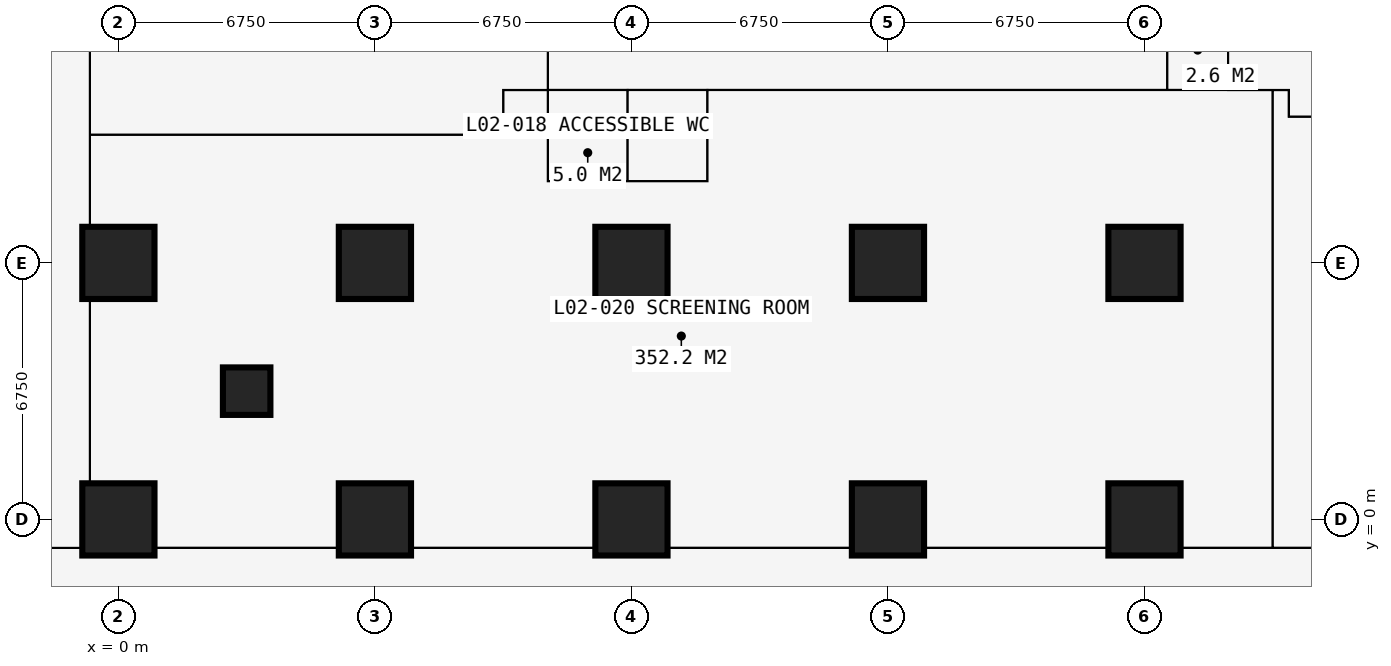
"""IFC4 building model, lengths in metres.
Left out: names, types, materials, properties, quantities, classifications, styles, units other than length and angle.
Written with IfcOpenShell. Run it as: python <this file> out.ifc"""

import sys

from ifc_helpers import new_model, si_unit, direction, frame, frame_2d, origin, origin_2d, place, context, subcontext, project, spatial, rectangle, extrude, element, fill, save


model = new_model("IFC4")
c1 = context("Model", 3, precision=1e-05, world=origin(), true_north=direction((0.0, 1.0)))
c2 = subcontext(c1, "Body", "Model", "MODEL_VIEW")
j1 = project(units=[si_unit("LENGTHUNIT", "METRE"), si_unit("PLANEANGLEUNIT", "RADIAN")], contexts=[c1])
p1 = place(None, origin())
s1 = spatial("IfcSite", under=j1, at=p1, CompositionType="ELEMENT")
p2 = place(p1, origin())
s2 = spatial("IfcBuilding", under=s1, at=p2, CompositionType="ELEMENT")
p3 = place(p2, frame((0.0, 0.0, 9.0)))
s3 = spatial("IfcBuildingStorey", under=s2, at=p3, CompositionType="ELEMENT", Elevation=9.0)
for number, where, z_axis, x_axis in (
    (1, (0.0, 0.0, 0.0), (0.0, 0.0, 1.0), (1.0, 0.0, 0.0)),
    (2, (0.0, 6.75, 0.0), (0.0, 0.0, 1.0), (1.0, 0.0, 0.0)),
):
    element("IfcColumn", number, at=place(p3, frame(where, z_axis=z_axis, x_axis=x_axis)), inside=s3, PredefinedType="COLUMN", context=c2, shape_type="SweptSolid", body=[
        extrude(rectangle(XDim=1.9, YDim=1.9, at=origin_2d()), origin(), (0.0, 0.0, 1.0), 4.5),
    ])
p4 = place(p3, frame((3.375, 3.375, 0.0), z_axis=(0.0, 0.0, 1.0), x_axis=(1.0, 0.0, 0.0)))
e3 = element("IfcColumn", 3, at=p4, inside=s3, PredefinedType="COLUMN", context=c2, shape_type="SweptSolid", body=[
    extrude(rectangle(XDim=1.25, YDim=1.25, at=origin_2d()), origin(), (0.0, 0.0, 1.0), 4.5),
])
for number, where, z_axis, x_axis in (
    (4, (6.75, 0.0, 0.0), (0.0, 0.0, 1.0), (1.0, 0.0, 0.0)),
    (5, (6.75, 6.75, 0.0), (0.0, 0.0, 1.0), (1.0, 0.0, 0.0)),
    (6, (13.5, 0.0, 0.0), (0.0, 0.0, 1.0), (1.0, 0.0, 0.0)),
    (7, (13.5, 6.75, 0.0), (0.0, 0.0, 1.0), (1.0, 0.0, 0.0)),
    (8, (20.25, 0.0, 0.0), (0.0, 0.0, 1.0), (1.0, 0.0, 0.0)),
    (9, (20.25, 6.75, 0.0), (0.0, 0.0, 1.0), (1.0, 0.0, 0.0)),
    (10, (27.0, 0.0, 0.0), (0.0, 0.0, 1.0), (1.0, 0.0, 0.0)),
    (11, (27.0, 6.75, 0.0), (0.0, 0.0, 1.0), (1.0, 0.0, 0.0)),
):
    element("IfcColumn", number, at=place(p3, frame(where, z_axis=z_axis, x_axis=x_axis)), inside=s3, PredefinedType="COLUMN", context=c2, shape_type="SweptSolid", body=[
        extrude(rectangle(XDim=1.9, YDim=1.9, at=origin_2d()), origin(), (0.0, 0.0, 1.0), 4.5),
    ])
p5 = place(p3, frame((-7.484, -0.75, 0.0), z_axis=(0.0, 0.0, 1.0), x_axis=(1.0, 0.0, 0.0)))
e12 = element("IfcWall", 12, at=p5, inside=s3, PredefinedType="PARTITIONING", context=c2, shape_type="SweptSolid", body=[
    extrude(rectangle(XDim=50.334, YDim=0.15, at=frame_2d((25.167, 0.0))), origin(), (0.0, 0.0, 1.0), 4.25),
])
p6 = place(p5, frame((21.934, 0.0, 0.0)))
e13 = element("IfcOpeningElement", 13, at=p6, cuts=e12, PredefinedType="OPENING", context=c2, shape_type="SweptSolid", body=[
    extrude(rectangle(XDim=1.6, YDim=2.4, at=frame_2d((0.8, 1.2))), frame((0.0, 0.085, 0.0), z_axis=(0.0, -1.0, 0.0), x_axis=(1.0, 0.0, 0.0)), (0.0, 0.0, 1.0), 0.17),
])
p7 = place(p3, frame((-0.75, -0.75, 0.0), z_axis=(0.0, 0.0, 1.0), x_axis=(0.0, 1.0, 0.0)))
e14 = element("IfcWall", 14, at=p7, inside=s3, PredefinedType="PARTITIONING", context=c2, shape_type="SweptSolid", body=[
    extrude(rectangle(XDim=41.984, YDim=0.15, at=frame_2d((20.992, 0.0))), origin(), (0.0, 0.0, 1.0), 4.25),
])
p8 = place(p7, frame((4.65, 0.0, 0.0)))
e15 = element("IfcOpeningElement", 15, at=p8, cuts=e14, PredefinedType="OPENING", context=c2, shape_type="SweptSolid", body=[
    extrude(rectangle(XDim=1.6, YDim=2.4, at=frame_2d((0.8, 1.2))), frame((0.0, 0.085, 0.0), z_axis=(0.0, -1.0, 0.0), x_axis=(1.0, 0.0, 0.0)), (0.0, 0.0, 1.0), 0.17),
])
p9 = place(p3, frame((-0.75, 10.125, 0.0), z_axis=(0.0, 0.0, 1.0), x_axis=(1.0, 0.0, 0.0)))
e16 = element("IfcWall", 16, at=p9, inside=s3, PredefinedType="PARTITIONING", context=c2, shape_type="SweptSolid", body=[
    extrude(rectangle(XDim=10.875, YDim=0.15, at=frame_2d((5.438, 0.0))), origin(), (0.0, 0.0, 1.0), 4.25),
])
p10 = place(p3, frame((10.125, 10.125, 0.0), z_axis=(0.0, 0.0, 1.0), x_axis=(0.0, 1.0, 0.0)))
e17 = element("IfcWall", 17, at=p10, inside=s3, PredefinedType="PARTITIONING", context=c2, shape_type="SweptSolid", body=[
    extrude(rectangle(XDim=1.175, YDim=0.15, at=frame_2d((0.587, 0.0))), origin(), (0.0, 0.0, 1.0), 4.25),
])
p11 = place(p3, frame((10.125, 11.3, 0.0), z_axis=(0.0, 0.0, 1.0), x_axis=(1.0, 0.0, 0.0)))
e18 = element("IfcWall", 18, at=p11, inside=s3, PredefinedType="PARTITIONING", context=c2, shape_type="SweptSolid", body=[
    extrude(rectangle(XDim=20.675, YDim=0.15, at=frame_2d((10.337, 0.0))), origin(), (0.0, 0.0, 1.0), 4.25),
])
p12 = place(p11, frame((1.725, 0.0, 0.0)))
e19 = element("IfcOpeningElement", 19, at=p12, cuts=e18, PredefinedType="OPENING", context=c2, shape_type="SweptSolid", body=[
    extrude(rectangle(XDim=1.0, YDim=2.2, at=frame_2d((0.5, 1.1))), frame((0.0, 0.085, 0.0), z_axis=(0.0, -1.0, 0.0), x_axis=(1.0, 0.0, 0.0)), (0.0, 0.0, 1.0), 0.17),
])
p13 = place(p11, frame((3.825, 0.0, 0.0)))
e20 = element("IfcOpeningElement", 20, at=p13, cuts=e18, PredefinedType="OPENING", context=c2, shape_type="SweptSolid", body=[
    extrude(rectangle(XDim=1.0, YDim=2.2, at=frame_2d((0.5, 1.1))), frame((0.0, 0.085, 0.0), z_axis=(0.0, -1.0, 0.0), x_axis=(1.0, 0.0, 0.0)), (0.0, 0.0, 1.0), 0.17),
])
p14 = place(p11, frame((10.675, 0.0, 0.0)))
e21 = element("IfcOpeningElement", 21, at=p14, cuts=e18, PredefinedType="OPENING", context=c2, shape_type="SweptSolid", body=[
    extrude(rectangle(XDim=1.5, YDim=2.2, at=frame_2d((0.75, 1.1))), frame((0.0, 0.085, 0.0), z_axis=(0.0, -1.0, 0.0), x_axis=(1.0, 0.0, 0.0)), (0.0, 0.0, 1.0), 0.17),
])
p15 = place(p3, frame((11.3, 8.9, 0.0), z_axis=(0.0, 0.0, 1.0), x_axis=(0.0, 1.0, 0.0)))
e22 = element("IfcWall", 22, at=p15, inside=s3, PredefinedType="PARTITIONING", context=c2, shape_type="SweptSolid", body=[
    extrude(rectangle(XDim=21.475, YDim=0.15, at=frame_2d((10.738, 0.0))), origin(), (0.0, 0.0, 1.0), 4.25),
])
p16 = place(p15, frame((16.65, 0.0, 0.0)))
e23 = element("IfcOpeningElement", 23, at=p16, cuts=e22, PredefinedType="OPENING", context=c2, shape_type="SweptSolid", body=[
    extrude(rectangle(XDim=1.0, YDim=2.2, at=frame_2d((0.5, 1.1))), frame((0.0, 0.085, 0.0), z_axis=(0.0, -1.0, 0.0), x_axis=(1.0, 0.0, 0.0)), (0.0, 0.0, 1.0), 0.17),
])
p17 = place(p15, frame((18.75, 0.0, 0.0)))
e24 = element("IfcOpeningElement", 24, at=p17, cuts=e22, PredefinedType="OPENING", context=c2, shape_type="SweptSolid", body=[
    extrude(rectangle(XDim=1.0, YDim=2.2, at=frame_2d((0.5, 1.1))), frame((0.0, 0.085, 0.0), z_axis=(0.0, -1.0, 0.0), x_axis=(1.0, 0.0, 0.0)), (0.0, 0.0, 1.0), 0.17),
])
p18 = place(p15, frame((8.45, 0.0, 0.0)))
e25 = element("IfcOpeningElement", 25, at=p18, cuts=e22, PredefinedType="OPENING", context=c2, shape_type="SweptSolid", body=[
    extrude(rectangle(XDim=1.6, YDim=2.4, at=frame_2d((0.8, 1.2))), frame((0.0, 0.085, 0.0), z_axis=(0.0, -1.0, 0.0), x_axis=(1.0, 0.0, 0.0)), (0.0, 0.0, 1.0), 0.17),
])
p19 = place(p3, frame((11.3, 8.9, 0.0), z_axis=(0.0, 0.0, 1.0), x_axis=(1.0, 0.0, 0.0)))
e26 = element("IfcWall", 26, at=p19, inside=s3, PredefinedType="PARTITIONING", context=c2, shape_type="SweptSolid", body=[
    extrude(rectangle(XDim=4.2, YDim=0.15, at=frame_2d((2.1, 0.0))), origin(), (0.0, 0.0, 1.0), 4.25),
])
p20 = place(p3, frame((13.4, 8.9, 0.0), z_axis=(0.0, 0.0, 1.0), x_axis=(0.0, 1.0, 0.0)))
e27 = element("IfcWall", 27, at=p20, inside=s3, PredefinedType="PARTITIONING", context=c2, shape_type="SweptSolid", body=[
    extrude(rectangle(XDim=2.4, YDim=0.1, at=frame_2d((1.2, 0.0))), origin(), (0.0, 0.0, 1.0), 3.752),
])
p21 = place(p3, frame((15.5, 8.9, 0.0), z_axis=(0.0, 0.0, 1.0), x_axis=(0.0, 1.0, 0.0)))
e28 = element("IfcWall", 28, at=p21, inside=s3, PredefinedType="PARTITIONING", context=c2, shape_type="SweptSolid", body=[
    extrude(rectangle(XDim=2.4, YDim=0.1, at=frame_2d((1.2, 0.0))), origin(), (0.0, 0.0, 1.0), 4.25),
])
p22 = place(p3, frame((27.6, 11.3, 0.0), z_axis=(0.0, 0.0, 1.0), x_axis=(0.0, 1.0, 0.0)))
e29 = element("IfcWall", 29, at=p22, inside=s3, PredefinedType="PARTITIONING", context=c2, shape_type="SweptSolid", body=[
    extrude(rectangle(XDim=1.6, YDim=0.15, at=frame_2d((0.8, 0.0))), origin(), (0.0, 0.0, 1.0), 4.25),
])
p23 = place(p22, frame((0.3, 0.0, 0.0)))
e30 = element("IfcOpeningElement", 30, at=p23, cuts=e29, PredefinedType="OPENING", context=c2, shape_type="SweptSolid", body=[
    extrude(rectangle(XDim=0.95, YDim=2.2, at=frame_2d((0.475, 1.1))), frame((0.0, 0.085, 0.0), z_axis=(0.0, -1.0, 0.0), x_axis=(1.0, 0.0, 0.0)), (0.0, 0.0, 1.0), 0.17),
])
p24 = place(p3, frame((29.2, 11.3, 0.0), z_axis=(0.0, 0.0, 1.0), x_axis=(0.0, 1.0, 0.0)))
e31 = element("IfcWall", 31, at=p24, inside=s3, PredefinedType="PARTITIONING", context=c2, shape_type="SweptSolid", body=[
    extrude(rectangle(XDim=20.3, YDim=0.15, at=frame_2d((10.15, 0.0))), origin(), (0.0, 0.0, 1.0), 4.25),
])
p25 = place(p24, frame((15.35, 0.0, 0.0)))
e32 = element("IfcOpeningElement", 32, at=p25, cuts=e31, PredefinedType="OPENING", context=c2, shape_type="SweptSolid", body=[
    extrude(rectangle(XDim=1.6, YDim=2.4, at=frame_2d((0.8, 1.2))), frame((0.0, 0.085, 0.0), z_axis=(0.0, -1.0, 0.0), x_axis=(1.0, 0.0, 0.0)), (0.0, 0.0, 1.0), 0.17),
])
p26 = place(p24, frame((8.35, 0.0, 0.0)))
e33 = element("IfcOpeningElement", 33, at=p26, cuts=e31, PredefinedType="OPENING", context=c2, shape_type="SweptSolid", body=[
    extrude(rectangle(XDim=1.2, YDim=2.2, at=frame_2d((0.6, 1.1))), frame((0.0, 0.085, 0.0), z_axis=(0.0, -1.0, 0.0), x_axis=(1.0, 0.0, 0.0)), (0.0, 0.0, 1.0), 0.17),
])
p27 = place(p3, frame((30.375, -0.75, 0.0), z_axis=(0.0, 0.0, 1.0), x_axis=(0.0, 1.0, 0.0)))
e34 = element("IfcWall", 34, at=p27, inside=s3, PredefinedType="PARTITIONING", context=c2, shape_type="SweptSolid", body=[
    extrude(rectangle(XDim=12.05, YDim=0.15, at=frame_2d((6.025, 0.0))), origin(), (0.0, 0.0, 1.0), 4.25),
])
p28 = place(p3, frame((30.8, 10.6, 0.0), z_axis=(0.0, 0.0, 1.0), x_axis=(0.0, 1.0, 0.0)))
e35 = element("IfcWall", 35, at=p28, inside=s3, PredefinedType="PARTITIONING", context=c2, shape_type="SweptSolid", body=[
    extrude(rectangle(XDim=0.7, YDim=0.15, at=frame_2d((0.35, 0.0))), origin(), (0.0, 0.0, 1.0), 4.25),
])
p29 = place(p3, frame((30.8, 10.6, 0.0), z_axis=(0.0, 0.0, 1.0), x_axis=(1.0, 0.0, 0.0)))
e36 = element("IfcWall", 36, at=p29, inside=s3, PredefinedType="PARTITIONING", context=c2, shape_type="SweptSolid", body=[
    extrude(rectangle(XDim=1.85, YDim=0.15, at=frame_2d((0.925, 0.0))), origin(), (0.0, 0.0, 1.0), 4.25),
])
p30 = place(p23, origin())
e37 = element("IfcDoor", 37, at=p30, inside=s3, OperationType="SINGLE_SWING_LEFT", PredefinedType="DOOR", context=c2, shape_type="SweptSolid", body=[
    extrude(rectangle(XDim=0.95, YDim=2.2, at=frame_2d((0.475, 1.1))), frame((0.0, 0.025, 0.0), z_axis=(0.0, -1.0, 0.0), x_axis=(1.0, 0.0, 0.0)), (0.0, 0.0, 1.0), 0.05),
])
fill(e30, e37)
p31 = place(p12, origin())
e38 = element("IfcDoor", 38, at=p31, inside=s3, OperationType="SINGLE_SWING_LEFT", PredefinedType="DOOR", context=c2, shape_type="SweptSolid", body=[
    extrude(rectangle(XDim=1.0, YDim=2.2, at=frame_2d((0.5, 1.1))), frame((0.0, 0.025, 0.0), z_axis=(0.0, -1.0, 0.0), x_axis=(1.0, 0.0, 0.0)), (0.0, 0.0, 1.0), 0.05),
])
fill(e19, e38)
p32 = place(p13, origin())
e39 = element("IfcDoor", 39, at=p32, inside=s3, OperationType="SINGLE_SWING_LEFT", PredefinedType="DOOR", context=c2, shape_type="SweptSolid", body=[
    extrude(rectangle(XDim=1.0, YDim=2.2, at=frame_2d((0.5, 1.1))), frame((0.0, 0.025, 0.0), z_axis=(0.0, -1.0, 0.0), x_axis=(1.0, 0.0, 0.0)), (0.0, 0.0, 1.0), 0.05),
])
fill(e20, e39)
p33 = place(p14, origin())
e40 = element("IfcDoor", 40, at=p33, inside=s3, OperationType="DOUBLE_DOOR_SINGLE_SWING", PredefinedType="DOOR", context=c2, shape_type="SweptSolid", body=[
    extrude(rectangle(XDim=1.5, YDim=2.2, at=frame_2d((0.75, 1.1))), frame((0.0, 0.025, 0.0), z_axis=(0.0, -1.0, 0.0), x_axis=(1.0, 0.0, 0.0)), (0.0, 0.0, 1.0), 0.05),
])
fill(e21, e40)
p34 = place(p6, origin())
e41 = element("IfcDoor", 41, at=p34, inside=s3, OperationType="DOUBLE_DOOR_SINGLE_SWING", PredefinedType="DOOR", context=c2, shape_type="SweptSolid", body=[
    extrude(rectangle(XDim=1.6, YDim=2.4, at=frame_2d((0.8, 1.2))), frame((0.0, 0.025, 0.0), z_axis=(0.0, -1.0, 0.0), x_axis=(1.0, 0.0, 0.0)), (0.0, 0.0, 1.0), 0.05),
])
fill(e13, e41)
p35 = place(p8, origin())
e42 = element("IfcDoor", 42, at=p35, inside=s3, OperationType="DOUBLE_DOOR_SINGLE_SWING", PredefinedType="DOOR", context=c2, shape_type="SweptSolid", body=[
    extrude(rectangle(XDim=1.6, YDim=2.4, at=frame_2d((0.8, 1.2))), frame((0.0, 0.025, 0.0), z_axis=(0.0, -1.0, 0.0), x_axis=(1.0, 0.0, 0.0)), (0.0, 0.0, 1.0), 0.05),
])
fill(e15, e42)
save(model, sys.argv[1])
